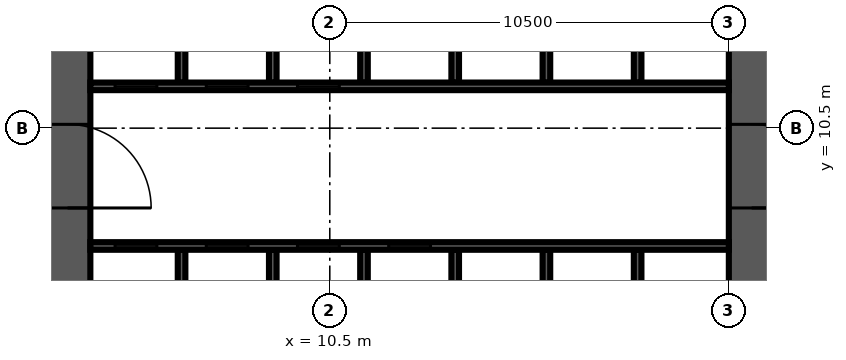
"""IFC4 building model, lengths in metres.
Left out: names, types, materials, properties, quantities, classifications, styles, units other than length and angle.
Written with IfcOpenShell. Run it as: python <this file> out.ifc"""

import sys

from ifc_helpers import new_model, si_unit, direction, frame, frame_2d, origin, place, context, subcontext, project, spatial, rectangle, extrude, source, transform, mapped, element, fill, save


model = new_model("IFC4")
c1 = context("Model", 3, precision=1e-05, world=origin(), true_north=direction((0.0, 1.0)))
c2 = subcontext(c1, "Body", "Model", "MODEL_VIEW")
j1 = project(units=[si_unit("LENGTHUNIT", "METRE"), si_unit("PLANEANGLEUNIT", "RADIAN")], contexts=[c1])
p1 = place(None, origin())
s1 = spatial("IfcSite", under=j1, at=p1, CompositionType="ELEMENT")
p2 = place(p1, origin())
s2 = spatial("IfcBuilding", under=s1, at=p2, CompositionType="ELEMENT")
p3 = place(p2, frame((0.0, 0.0, 44.7)))
s3 = spatial("IfcBuildingStorey", under=s2, at=p3, CompositionType="ELEMENT", Elevation=44.7)
m1 = source(origin(), c2, "Body", "SweptSolid", [
    extrude(rectangle(XDim=18.0, YDim=1.2, at=frame_2d((9.0, 0.0))), origin(), (0.0, 0.0, 1.0), 4.2),
])
p4 = place(p3, frame((3.6, 4.2, 0.0), z_axis=(0.0, 0.0, 1.0), x_axis=(0.0, 1.0, 0.0)))
e1 = element("IfcWall", 1, at=p4, inside=s3, PredefinedType="SHEAR", context=c2, shape_type="MappedRepresentation", body=[
    mapped(m1, transform((0.0, 0.0, 0.0), scale=1.0)),
])
m2 = source(origin(), c2, "Body", "SweptSolid", [
    extrude(rectangle(XDim=2.2, YDim=2.1, at=frame_2d((1.1, 1.05))), frame((0.0, 0.61, 0.0), z_axis=(0.0, -1.0, 0.0), x_axis=(1.0, 0.0, 0.0)), (0.0, 0.0, 1.0), 1.22),
])
p5 = place(p4, frame((4.2, 0.0, 0.0)))
e2 = element("IfcOpeningElement", 2, at=p5, cuts=e1, PredefinedType="OPENING", context=c2, shape_type="MappedRepresentation", body=[
    mapped(m2, transform((0.0, 0.0, 0.0), scale=1.0)),
])
m3 = source(origin(), c2, "Body", "SweptSolid", [
    extrude(rectangle(XDim=16.8, YDim=1.2, at=frame_2d((8.4, 0.0))), origin(), (0.0, 0.0, 1.0), 4.2),
])
p6 = place(p3, frame((21.6, 4.2, 0.0), z_axis=(0.0, 0.0, 1.0), x_axis=(0.0, 1.0, 0.0)))
e3 = element("IfcWall", 3, at=p6, inside=s3, PredefinedType="SHEAR", context=c2, shape_type="MappedRepresentation", body=[
    mapped(m3, transform((0.0, 0.0, 0.0), scale=1.0)),
])
p7 = place(p6, frame((4.2, 0.0, 0.0)))
e4 = element("IfcOpeningElement", 4, at=p7, cuts=e3, PredefinedType="OPENING", context=c2, shape_type="MappedRepresentation", body=[
    mapped(m2, transform((0.0, 0.0, 0.0), scale=1.0)),
])
m4 = source(origin(), c2, "Body", "SweptSolid", [
    extrude(rectangle(XDim=1.2, YDim=2.1, at=frame_2d((0.6, 1.05))), frame((0.0, 0.61, 0.0), z_axis=(0.0, -1.0, 0.0), x_axis=(1.0, 0.0, 0.0)), (0.0, 0.0, 1.0), 1.22),
])
p8 = place(p6, frame((14.7, 0.0, 0.0)))
e5 = element("IfcOpeningElement", 5, at=p8, cuts=e3, PredefinedType="OPENING", context=c2, shape_type="MappedRepresentation", body=[
    mapped(m4, transform((0.0, 0.0, 0.0), scale=1.0)),
])
m5 = source(origin(), c2, "Body", "SweptSolid", [
    extrude(rectangle(XDim=3.1, YDim=0.2, at=frame_2d((1.55, 0.0))), origin(), (0.0, 0.0, 1.0), 4.2),
])
for number, where, z_axis, x_axis in (
    (6, (6.6, 4.2, 0.0), (0.0, 0.0, 1.0), (0.0, 1.0, 0.0)),
    (7, (9.0, 4.2, 0.0), (0.0, 0.0, 1.0), (0.0, 1.0, 0.0)),
    (8, (11.4, 4.2, 0.0), (0.0, 0.0, 1.0), (0.0, 1.0, 0.0)),
    (9, (13.8, 4.2, 0.0), (0.0, 0.0, 1.0), (0.0, 1.0, 0.0)),
    (10, (16.2, 4.2, 0.0), (0.0, 0.0, 1.0), (0.0, 1.0, 0.0)),
    (11, (18.6, 4.2, 0.0), (0.0, 0.0, 1.0), (0.0, 1.0, 0.0)),
):
    element("IfcWall", number, at=place(p3, frame(where, z_axis=z_axis, x_axis=x_axis)), inside=s3, PredefinedType="SOLIDWALL", context=c2, shape_type="MappedRepresentation", body=[
        mapped(m5, transform((0.0, 0.0, 0.0), scale=1.0)),
    ])
m6 = source(origin(), c2, "Body", "SweptSolid", [
    extrude(rectangle(XDim=3.0, YDim=0.2, at=frame_2d((1.5, 0.0))), origin(), (0.0, 0.0, 1.0), 4.2),
])
for number, where, z_axis, x_axis in (
    (12, (6.6, 11.7, 0.0), (0.0, 0.0, 1.0), (0.0, 1.0, 0.0)),
    (13, (9.0, 11.7, 0.0), (0.0, 0.0, 1.0), (0.0, 1.0, 0.0)),
    (14, (11.4, 11.7, 0.0), (0.0, 0.0, 1.0), (0.0, 1.0, 0.0)),
    (15, (13.8, 11.7, 0.0), (0.0, 0.0, 1.0), (0.0, 1.0, 0.0)),
    (16, (16.2, 11.7, 0.0), (0.0, 0.0, 1.0), (0.0, 1.0, 0.0)),
    (17, (18.6, 11.7, 0.0), (0.0, 0.0, 1.0), (0.0, 1.0, 0.0)),
):
    element("IfcWall", number, at=place(p3, frame(where, z_axis=z_axis, x_axis=x_axis)), inside=s3, PredefinedType="SOLIDWALL", context=c2, shape_type="MappedRepresentation", body=[
        mapped(m6, transform((0.0, 0.0, 0.0), scale=1.0)),
    ])
m7 = source(origin(), c2, "Body", "SweptSolid", [
    extrude(rectangle(XDim=16.8, YDim=0.2, at=frame_2d((8.4, 0.0))), origin(), (0.0, 0.0, 1.0), 4.2),
])
p9 = place(p3, frame((4.2, 7.4, 0.0), z_axis=(0.0, 0.0, 1.0), x_axis=(1.0, 0.0, 0.0)))
e18 = element("IfcWall", 18, at=p9, inside=s3, PredefinedType="SOLIDWALL", context=c2, shape_type="MappedRepresentation", body=[
    mapped(m7, transform((0.0, 0.0, 0.0), scale=1.0)),
])
m8 = source(origin(), c2, "Body", "SweptSolid", [
    extrude(rectangle(XDim=1.1, YDim=2.1, at=frame_2d((0.55, 1.05))), frame((0.0, 0.11, 0.0), z_axis=(0.0, -1.0, 0.0), x_axis=(1.0, 0.0, 0.0)), (0.0, 0.0, 1.0), 0.22),
])
p10 = place(p9, frame((0.65, 0.0, 0.0)))
e19 = element("IfcOpeningElement", 19, at=p10, cuts=e18, PredefinedType="OPENING", context=c2, shape_type="MappedRepresentation", body=[
    mapped(m8, transform((0.0, 0.0, 0.0), scale=1.0)),
])
p11 = place(p9, frame((3.05, 0.0, 0.0)))
e20 = element("IfcOpeningElement", 20, at=p11, cuts=e18, PredefinedType="OPENING", context=c2, shape_type="MappedRepresentation", body=[
    mapped(m8, transform((0.0, 0.0, 0.0), scale=1.0)),
])
p12 = place(p9, frame((5.45, 0.0, 0.0)))
e21 = element("IfcOpeningElement", 21, at=p12, cuts=e18, PredefinedType="OPENING", context=c2, shape_type="MappedRepresentation", body=[
    mapped(m8, transform((0.0, 0.0, 0.0), scale=1.0)),
])
p13 = place(p9, frame((7.85, 0.0, 0.0)))
e22 = element("IfcOpeningElement", 22, at=p13, cuts=e18, PredefinedType="OPENING", context=c2, shape_type="MappedRepresentation", body=[
    mapped(m8, transform((0.0, 0.0, 0.0), scale=1.0)),
])
p14 = place(p3, frame((4.2, 11.6, 0.0), z_axis=(0.0, 0.0, 1.0), x_axis=(1.0, 0.0, 0.0)))
e23 = element("IfcWall", 23, at=p14, inside=s3, PredefinedType="SOLIDWALL", context=c2, shape_type="MappedRepresentation", body=[
    mapped(m7, transform((0.0, 0.0, 0.0), scale=1.0)),
])
p15 = place(p14, frame((0.65, 0.0, 0.0)))
e24 = element("IfcOpeningElement", 24, at=p15, cuts=e23, PredefinedType="OPENING", context=c2, shape_type="MappedRepresentation", body=[
    mapped(m8, transform((0.0, 0.0, 0.0), scale=1.0)),
])
p16 = place(p14, frame((3.05, 0.0, 0.0)))
e25 = element("IfcOpeningElement", 25, at=p16, cuts=e23, PredefinedType="OPENING", context=c2, shape_type="MappedRepresentation", body=[
    mapped(m8, transform((0.0, 0.0, 0.0), scale=1.0)),
])
p17 = place(p14, frame((5.45, 0.0, 0.0)))
e26 = element("IfcOpeningElement", 26, at=p17, cuts=e23, PredefinedType="OPENING", context=c2, shape_type="MappedRepresentation", body=[
    mapped(m8, transform((0.0, 0.0, 0.0), scale=1.0)),
])
m9 = source(origin(), c2, "Body", "SweptSolid", [
    extrude(rectangle(XDim=1.1, YDim=2.1, at=frame_2d((0.55, 1.05))), frame((0.0, 0.025, 0.0), z_axis=(0.0, -1.0, 0.0), x_axis=(1.0, 0.0, 0.0)), (0.0, 0.0, 1.0), 0.05),
])
p18 = place(p10, origin())
e27 = element("IfcDoor", 27, at=p18, inside=s3, OperationType="SLIDING_TO_LEFT", PredefinedType="DOOR", context=c2, shape_type="MappedRepresentation", body=[
    mapped(m9, transform((0.0, 0.0, 0.0), scale=1.0)),
])
fill(e19, e27)
p19 = place(p11, origin())
e28 = element("IfcDoor", 28, at=p19, inside=s3, OperationType="SLIDING_TO_LEFT", PredefinedType="DOOR", context=c2, shape_type="MappedRepresentation", body=[
    mapped(m9, transform((0.0, 0.0, 0.0), scale=1.0)),
])
fill(e20, e28)
p20 = place(p12, origin())
e29 = element("IfcDoor", 29, at=p20, inside=s3, OperationType="SLIDING_TO_LEFT", PredefinedType="DOOR", context=c2, shape_type="MappedRepresentation", body=[
    mapped(m9, transform((0.0, 0.0, 0.0), scale=1.0)),
])
fill(e21, e29)
p21 = place(p13, origin())
e30 = element("IfcDoor", 30, at=p21, inside=s3, OperationType="SLIDING_TO_LEFT", PredefinedType="DOOR", context=c2, shape_type="MappedRepresentation", body=[
    mapped(m9, transform((0.0, 0.0, 0.0), scale=1.0)),
])
fill(e22, e30)
p22 = place(p15, origin())
e31 = element("IfcDoor", 31, at=p22, inside=s3, OperationType="SLIDING_TO_LEFT", PredefinedType="DOOR", context=c2, shape_type="MappedRepresentation", body=[
    mapped(m9, transform((0.0, 0.0, 0.0), scale=1.0)),
])
fill(e24, e31)
p23 = place(p16, origin())
e32 = element("IfcDoor", 32, at=p23, inside=s3, OperationType="SLIDING_TO_LEFT", PredefinedType="DOOR", context=c2, shape_type="MappedRepresentation", body=[
    mapped(m9, transform((0.0, 0.0, 0.0), scale=1.0)),
])
fill(e25, e32)
p24 = place(p17, origin())
e33 = element("IfcDoor", 33, at=p24, inside=s3, OperationType="SLIDING_TO_LEFT", PredefinedType="DOOR", context=c2, shape_type="MappedRepresentation", body=[
    mapped(m9, transform((0.0, 0.0, 0.0), scale=1.0)),
])
fill(e26, e33)
m10 = source(origin(), c2, "Body", "SweptSolid", [
    extrude(rectangle(XDim=2.2, YDim=2.1, at=frame_2d((1.1, 1.05))), frame((0.0, 0.025, 0.0), z_axis=(0.0, -1.0, 0.0), x_axis=(1.0, 0.0, 0.0)), (0.0, 0.0, 1.0), 0.05),
])
p25 = place(p7, origin())
e34 = element("IfcDoor", 34, at=p25, inside=s3, OperationType="DOUBLE_DOOR_SINGLE_SWING", PredefinedType="DOOR", context=c2, shape_type="MappedRepresentation", body=[
    mapped(m10, transform((0.0, 0.0, 0.0), scale=1.0)),
])
fill(e4, e34)
p26 = place(p5, origin())
e35 = element("IfcDoor", 35, at=p26, inside=s3, OperationType="DOUBLE_DOOR_SINGLE_SWING", PredefinedType="DOOR", context=c2, shape_type="MappedRepresentation", body=[
    mapped(m10, transform((0.0, 0.0, 0.0), scale=1.0)),
])
fill(e2, e35)
save(model, sys.argv[1])
